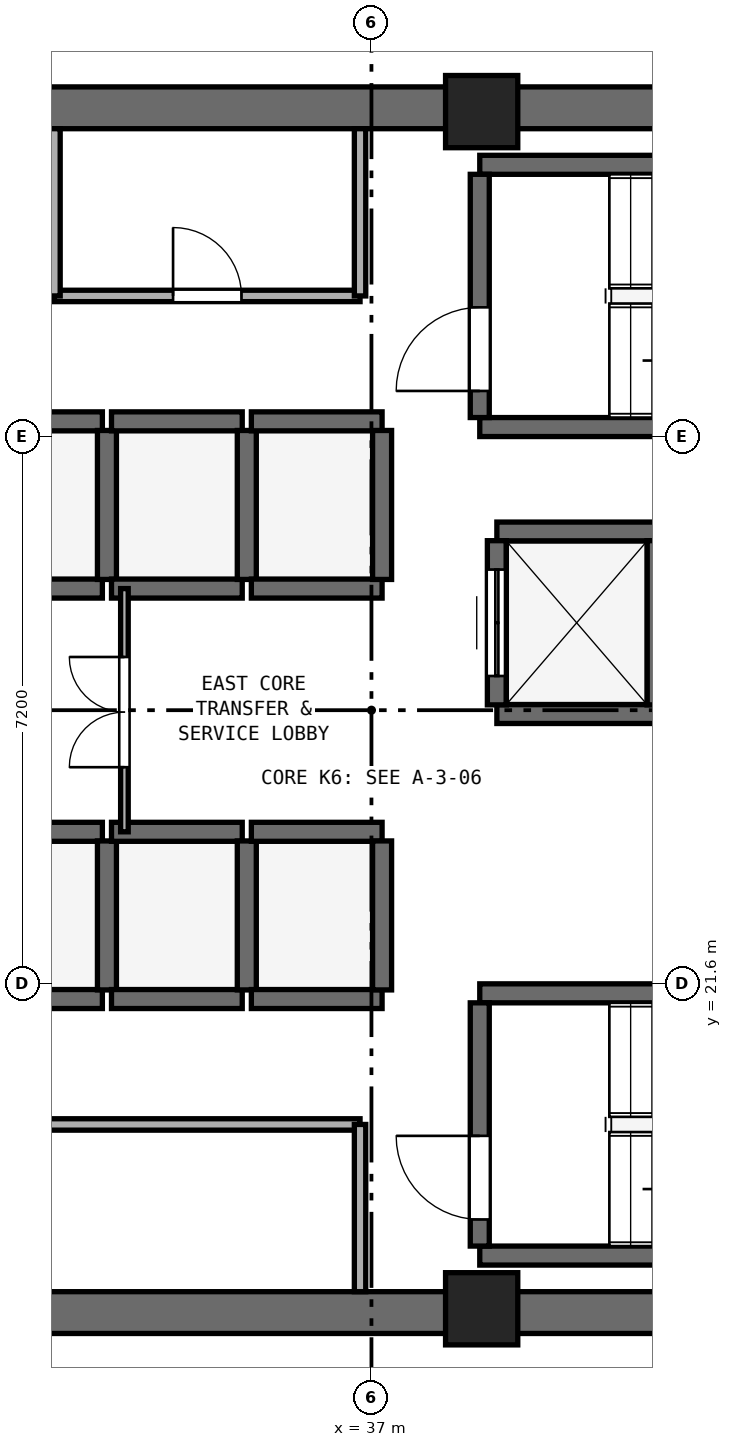
"""IFC4 building model, lengths in metres.
Left out: names, types, materials, properties, quantities, classifications, styles, units other than length and angle.
Written with IfcOpenShell. Run it as: python <this file> out.ifc"""

import sys

from ifc_helpers import new_model, si_unit, direction, frame, frame_2d, origin, origin_2d, place, context, subcontext, project, spatial, rectangle, extrude, element, fill, save


model = new_model("IFC4")
c1 = context("Model", 3, precision=1e-05, world=origin(), true_north=direction((0.0, 1.0)))
c2 = subcontext(c1, "Body", "Model", "MODEL_VIEW")
j1 = project(units=[si_unit("LENGTHUNIT", "METRE"), si_unit("PLANEANGLEUNIT", "RADIAN")], contexts=[c1])
p1 = place(None, origin())
s1 = spatial("IfcSite", under=j1, at=p1, CompositionType="ELEMENT")
p2 = place(p1, origin())
s2 = spatial("IfcBuilding", under=s1, at=p2, CompositionType="ELEMENT")
p3 = place(p2, frame((0.0, 0.0, 220.0)))
s3 = spatial("IfcBuildingStorey", under=s2, at=p3, CompositionType="ELEMENT", Elevation=220.0)
for number, where, z_axis, x_axis in (
    (1, (25.4, 17.275, 0.0), (0.0, 0.0, 1.0), (1.0, 0.0, 0.0)),
    (2, (25.4, 33.125, 0.0), (0.0, 0.0, 1.0), (1.0, 0.0, 0.0)),
):
    element("IfcWall", number, at=place(p3, frame(where, z_axis=z_axis, x_axis=x_axis)), inside=s3, PredefinedType="SHEAR", context=c2, shape_type="SweptSolid", body=[
        extrude(rectangle(XDim=23.2, YDim=0.55, at=frame_2d((11.6, 0.0))), origin(), (0.0, 0.0, 1.0), 4.71),
    ])
for number, where, z_axis, x_axis in (
    (3, (38.45, 17.325, 0.0), (0.0, 0.0, 1.0), (1.0, 0.0, 0.0)),
    (4, (38.45, 33.075, 0.0), (0.0, 0.0, 1.0), (1.0, 0.0, 0.0)),
):
    element("IfcColumn", number, at=place(p3, frame(where, z_axis=z_axis, x_axis=x_axis)), inside=s3, PredefinedType="PILASTER", context=c2, shape_type="SweptSolid", body=[
        extrude(rectangle(XDim=0.95, YDim=0.95, at=origin_2d()), origin(), (0.0, 0.0, 1.0), 5.0),
    ])
for number, where, z_axis, x_axis in (
    (5, (38.425, 28.925, 0.0), (0.0, 0.0, 1.0), (1.0, 0.0, 0.0)),
    (6, (38.425, 32.375, 0.0), (0.0, 0.0, 1.0), (1.0, 0.0, 0.0)),
):
    element("IfcWall", number, at=place(p3, frame(where, z_axis=z_axis, x_axis=x_axis)), inside=s3, PredefinedType="SHEAR", context=c2, shape_type="SweptSolid", body=[
        extrude(rectangle(XDim=7.3, YDim=0.25, at=frame_2d((3.65, 0.0))), origin(), (0.0, 0.0, 1.0), 4.71),
    ])
p4 = place(p3, frame((38.425, 29.05, 0.0), z_axis=(0.0, 0.0, 1.0), x_axis=(0.0, 1.0, 0.0)))
e7 = element("IfcWall", 7, at=p4, inside=s3, PredefinedType="SHEAR", context=c2, shape_type="SweptSolid", body=[
    extrude(rectangle(XDim=3.2, YDim=0.25, at=frame_2d((1.6, 0.0))), origin(), (0.0, 0.0, 1.0), 4.71),
])
p5 = place(p4, frame((0.35, 0.0, 0.0)))
e8 = element("IfcOpeningElement", 8, at=p5, cuts=e7, PredefinedType="OPENING", context=c2, shape_type="SweptSolid", body=[
    extrude(rectangle(XDim=1.1, YDim=2.15, at=frame_2d((0.55, 1.075))), frame((0.0, 0.135, 0.0), z_axis=(0.0, -1.0, 0.0), x_axis=(1.0, 0.0, 0.0)), (0.0, 0.0, 1.0), 0.27),
])
for number, where, z_axis, x_axis in (
    (9, (38.425, 18.025, 0.0), (0.0, 0.0, 1.0), (1.0, 0.0, 0.0)),
    (10, (38.425, 21.475, 0.0), (0.0, 0.0, 1.0), (1.0, 0.0, 0.0)),
):
    element("IfcWall", number, at=place(p3, frame(where, z_axis=z_axis, x_axis=x_axis)), inside=s3, PredefinedType="SHEAR", context=c2, shape_type="SweptSolid", body=[
        extrude(rectangle(XDim=7.3, YDim=0.25, at=frame_2d((3.65, 0.0))), origin(), (0.0, 0.0, 1.0), 4.71),
    ])
p6 = place(p3, frame((38.425, 18.15, 0.0), z_axis=(0.0, 0.0, 1.0), x_axis=(0.0, 1.0, 0.0)))
e11 = element("IfcWall", 11, at=p6, inside=s3, PredefinedType="SHEAR", context=c2, shape_type="SweptSolid", body=[
    extrude(rectangle(XDim=3.2, YDim=0.25, at=frame_2d((1.6, 0.0))), origin(), (0.0, 0.0, 1.0), 4.71),
])
p7 = place(p6, frame((0.35, 0.0, 0.0)))
e12 = element("IfcOpeningElement", 12, at=p7, cuts=e11, PredefinedType="OPENING", context=c2, shape_type="SweptSolid", body=[
    extrude(rectangle(XDim=1.1, YDim=2.15, at=frame_2d((0.55, 1.075))), frame((0.0, 0.135, 0.0), z_axis=(0.0, -1.0, 0.0), x_axis=(1.0, 0.0, 0.0)), (0.0, 0.0, 1.0), 0.27),
])
for number, where, z_axis, x_axis in (
    (13, (31.74, 21.4, 0.0), (0.0, 0.0, 1.0), (1.0, 0.0, 0.0)),
    (14, (31.74, 23.6, 0.0), (0.0, 0.0, 1.0), (1.0, 0.0, 0.0)),
):
    element("IfcWall", number, at=place(p3, frame(where, z_axis=z_axis, x_axis=x_axis)), inside=s3, PredefinedType="SHEAR", context=c2, shape_type="SweptSolid", body=[
        extrude(rectangle(XDim=1.72, YDim=0.25, at=frame_2d((0.86, 0.0))), origin(), (0.0, 0.0, 1.0), 4.71),
    ])
p8 = place(p3, frame((33.52, 21.52, 0.0), z_axis=(0.0, 0.0, 1.0), x_axis=(0.0, 1.0, 0.0)))
e15 = element("IfcWall", 15, at=p8, inside=s3, PredefinedType="SHEAR", context=c2, shape_type="SweptSolid", body=[
    extrude(rectangle(XDim=1.96, YDim=0.25, at=frame_2d((0.98, 0.0))), origin(), (0.0, 0.0, 1.0), 4.71),
])
for number, where, z_axis, x_axis in (
    (16, (33.58, 21.4, 0.0), (0.0, 0.0, 1.0), (1.0, 0.0, 0.0)),
    (17, (33.58, 23.6, 0.0), (0.0, 0.0, 1.0), (1.0, 0.0, 0.0)),
):
    element("IfcWall", number, at=place(p3, frame(where, z_axis=z_axis, x_axis=x_axis)), inside=s3, PredefinedType="SHEAR", context=c2, shape_type="SweptSolid", body=[
        extrude(rectangle(XDim=1.72, YDim=0.25, at=frame_2d((0.86, 0.0))), origin(), (0.0, 0.0, 1.0), 4.71),
    ])
p9 = place(p3, frame((35.36, 21.52, 0.0), z_axis=(0.0, 0.0, 1.0), x_axis=(0.0, 1.0, 0.0)))
e18 = element("IfcWall", 18, at=p9, inside=s3, PredefinedType="SHEAR", context=c2, shape_type="SweptSolid", body=[
    extrude(rectangle(XDim=1.96, YDim=0.25, at=frame_2d((0.98, 0.0))), origin(), (0.0, 0.0, 1.0), 4.71),
])
for number, where, z_axis, x_axis in (
    (19, (35.42, 21.4, 0.0), (0.0, 0.0, 1.0), (1.0, 0.0, 0.0)),
    (20, (35.42, 23.6, 0.0), (0.0, 0.0, 1.0), (1.0, 0.0, 0.0)),
):
    element("IfcWall", number, at=place(p3, frame(where, z_axis=z_axis, x_axis=x_axis)), inside=s3, PredefinedType="SHEAR", context=c2, shape_type="SweptSolid", body=[
        extrude(rectangle(XDim=1.72, YDim=0.25, at=frame_2d((0.86, 0.0))), origin(), (0.0, 0.0, 1.0), 4.71),
    ])
p10 = place(p3, frame((37.14, 21.52, 0.0), z_axis=(0.0, 0.0, 1.0), x_axis=(0.0, 1.0, 0.0)))
e21 = element("IfcWall", 21, at=p10, inside=s3, PredefinedType="SHEAR", context=c2, shape_type="SweptSolid", body=[
    extrude(rectangle(XDim=1.96, YDim=0.25, at=frame_2d((0.98, 0.0))), origin(), (0.0, 0.0, 1.0), 4.71),
])
for number, where, z_axis, x_axis in (
    (22, (31.74, 26.8, 0.0), (0.0, 0.0, 1.0), (1.0, 0.0, 0.0)),
    (23, (31.74, 29.0, 0.0), (0.0, 0.0, 1.0), (1.0, 0.0, 0.0)),
):
    element("IfcWall", number, at=place(p3, frame(where, z_axis=z_axis, x_axis=x_axis)), inside=s3, PredefinedType="SHEAR", context=c2, shape_type="SweptSolid", body=[
        extrude(rectangle(XDim=1.72, YDim=0.25, at=frame_2d((0.86, 0.0))), origin(), (0.0, 0.0, 1.0), 4.71),
    ])
p11 = place(p3, frame((33.52, 26.92, 0.0), z_axis=(0.0, 0.0, 1.0), x_axis=(0.0, 1.0, 0.0)))
e24 = element("IfcWall", 24, at=p11, inside=s3, PredefinedType="SHEAR", context=c2, shape_type="SweptSolid", body=[
    extrude(rectangle(XDim=1.96, YDim=0.25, at=frame_2d((0.98, 0.0))), origin(), (0.0, 0.0, 1.0), 4.71),
])
for number, where, z_axis, x_axis in (
    (25, (33.58, 26.8, 0.0), (0.0, 0.0, 1.0), (1.0, 0.0, 0.0)),
    (26, (33.58, 29.0, 0.0), (0.0, 0.0, 1.0), (1.0, 0.0, 0.0)),
):
    element("IfcWall", number, at=place(p3, frame(where, z_axis=z_axis, x_axis=x_axis)), inside=s3, PredefinedType="SHEAR", context=c2, shape_type="SweptSolid", body=[
        extrude(rectangle(XDim=1.72, YDim=0.25, at=frame_2d((0.86, 0.0))), origin(), (0.0, 0.0, 1.0), 4.71),
    ])
p12 = place(p3, frame((35.36, 26.92, 0.0), z_axis=(0.0, 0.0, 1.0), x_axis=(0.0, 1.0, 0.0)))
e27 = element("IfcWall", 27, at=p12, inside=s3, PredefinedType="SHEAR", context=c2, shape_type="SweptSolid", body=[
    extrude(rectangle(XDim=1.96, YDim=0.25, at=frame_2d((0.98, 0.0))), origin(), (0.0, 0.0, 1.0), 4.71),
])
for number, where, z_axis, x_axis in (
    (28, (35.42, 26.8, 0.0), (0.0, 0.0, 1.0), (1.0, 0.0, 0.0)),
    (29, (35.42, 29.0, 0.0), (0.0, 0.0, 1.0), (1.0, 0.0, 0.0)),
):
    element("IfcWall", number, at=place(p3, frame(where, z_axis=z_axis, x_axis=x_axis)), inside=s3, PredefinedType="SHEAR", context=c2, shape_type="SweptSolid", body=[
        extrude(rectangle(XDim=1.72, YDim=0.25, at=frame_2d((0.86, 0.0))), origin(), (0.0, 0.0, 1.0), 4.71),
    ])
p13 = place(p3, frame((37.14, 26.92, 0.0), z_axis=(0.0, 0.0, 1.0), x_axis=(0.0, 1.0, 0.0)))
e30 = element("IfcWall", 30, at=p13, inside=s3, PredefinedType="SHEAR", context=c2, shape_type="SweptSolid", body=[
    extrude(rectangle(XDim=1.96, YDim=0.25, at=frame_2d((0.98, 0.0))), origin(), (0.0, 0.0, 1.0), 4.71),
])
for number, where, z_axis, x_axis in (
    (31, (38.65, 25.15, 0.0), (0.0, 0.0, 1.0), (1.0, 0.0, 0.0)),
    (32, (38.65, 27.55, 0.0), (0.0, 0.0, 1.0), (1.0, 0.0, 0.0)),
):
    element("IfcWall", number, at=place(p3, frame(where, z_axis=z_axis, x_axis=x_axis)), inside=s3, PredefinedType="SHEAR", context=c2, shape_type="SweptSolid", body=[
        extrude(rectangle(XDim=2.1, YDim=0.25, at=frame_2d((1.05, 0.0))), origin(), (0.0, 0.0, 1.0), 4.71),
    ])
p14 = place(p3, frame((38.65, 25.27, 0.0), z_axis=(0.0, 0.0, 1.0), x_axis=(0.0, 1.0, 0.0)))
e33 = element("IfcWall", 33, at=p14, inside=s3, PredefinedType="SHEAR", context=c2, shape_type="SweptSolid", body=[
    extrude(rectangle(XDim=2.16, YDim=0.25, at=frame_2d((1.08, 0.0))), origin(), (0.0, 0.0, 1.0), 4.71),
])
p15 = place(p14, frame((0.38, 0.0, 0.0)))
e34 = element("IfcOpeningElement", 34, at=p15, cuts=e33, PredefinedType="OPENING", context=c2, shape_type="SweptSolid", body=[
    extrude(rectangle(XDim=1.4, YDim=2.2, at=frame_2d((0.7, 1.1))), frame((0.0, 0.135, 0.0), z_axis=(0.0, -1.0, 0.0), x_axis=(1.0, 0.0, 0.0)), (0.0, 0.0, 1.0), 0.27),
])
p16 = place(p3, frame((40.75, 25.27, 0.0), z_axis=(0.0, 0.0, 1.0), x_axis=(0.0, 1.0, 0.0)))
e35 = element("IfcWall", 35, at=p16, inside=s3, PredefinedType="SHEAR", context=c2, shape_type="SweptSolid", body=[
    extrude(rectangle(XDim=2.16, YDim=0.25, at=frame_2d((1.08, 0.0))), origin(), (0.0, 0.0, 1.0), 4.71),
])
p17 = place(p3, frame((32.83, 30.65, 0.0), z_axis=(0.0, 0.0, 1.0), x_axis=(1.0, 0.0, 0.0)))
e36 = element("IfcWall", 36, at=p17, inside=s3, PredefinedType="PARTITIONING", context=c2, shape_type="SweptSolid", body=[
    extrude(rectangle(XDim=4.02, YDim=0.15, at=frame_2d((2.01, 0.0))), origin(), (0.0, 0.0, 1.0), 4.71),
])
p18 = place(p17, frame((1.56, 0.0, 0.0)))
e37 = element("IfcOpeningElement", 37, at=p18, cuts=e36, PredefinedType="OPENING", context=c2, shape_type="SweptSolid", body=[
    extrude(rectangle(XDim=0.9, YDim=2.1, at=frame_2d((0.45, 1.05))), frame((0.0, 0.085, 0.0), z_axis=(0.0, -1.0, 0.0), x_axis=(1.0, 0.0, 0.0)), (0.0, 0.0, 1.0), 0.17),
])
for number, where, z_axis, x_axis in (
    (38, (32.83, 30.65, 0.0), (0.0, 0.0, 1.0), (0.0, 1.0, 0.0)),
    (39, (36.85, 30.65, 0.0), (0.0, 0.0, 1.0), (0.0, 1.0, 0.0)),
):
    element("IfcWall", number, at=place(p3, frame(where, z_axis=z_axis, x_axis=x_axis)), inside=s3, PredefinedType="PARTITIONING", context=c2, shape_type="SweptSolid", body=[
        extrude(rectangle(XDim=2.2, YDim=0.15, at=frame_2d((1.1, 0.0))), origin(), (0.0, 0.0, 1.0), 4.71),
    ])
p19 = place(p3, frame((26.07, 19.75, 0.0), z_axis=(0.0, 0.0, 1.0), x_axis=(1.0, 0.0, 0.0)))
e40 = element("IfcWall", 40, at=p19, inside=s3, PredefinedType="PARTITIONING", context=c2, shape_type="SweptSolid", body=[
    extrude(rectangle(XDim=10.78, YDim=0.15, at=frame_2d((5.39, 0.0))), origin(), (0.0, 0.0, 1.0), 4.71),
])
p20 = place(p19, frame((4.915, 0.0, 0.0)))
e41 = element("IfcOpeningElement", 41, at=p20, cuts=e40, PredefinedType="OPENING", context=c2, shape_type="SweptSolid", body=[
    extrude(rectangle(XDim=0.95, YDim=2.1, at=frame_2d((0.475, 1.05))), frame((0.0, 0.085, 0.0), z_axis=(0.0, -1.0, 0.0), x_axis=(1.0, 0.0, 0.0)), (0.0, 0.0, 1.0), 0.17),
])
p21 = place(p3, frame((36.85, 17.55, 0.0), z_axis=(0.0, 0.0, 1.0), x_axis=(0.0, 1.0, 0.0)))
e42 = element("IfcWall", 42, at=p21, inside=s3, PredefinedType="PARTITIONING", context=c2, shape_type="SweptSolid", body=[
    extrude(rectangle(XDim=2.2, YDim=0.15, at=frame_2d((1.1, 0.0))), origin(), (0.0, 0.0, 1.0), 4.71),
])
p22 = place(p3, frame((33.75, 23.6, 0.0), z_axis=(0.0, 0.0, 1.0), x_axis=(0.0, 1.0, 0.0)))
e43 = element("IfcWall", 43, at=p22, inside=s3, PredefinedType="PARTITIONING", context=c2, shape_type="SweptSolid", body=[
    extrude(rectangle(XDim=3.2, YDim=0.1, at=frame_2d((1.6, 0.0))), origin(), (0.0, 0.0, 1.0), 4.71),
])
p23 = place(p22, frame((0.85, 0.0, 0.0)))
e44 = element("IfcOpeningElement", 44, at=p23, cuts=e43, PredefinedType="OPENING", context=c2, shape_type="SweptSolid", body=[
    extrude(rectangle(XDim=1.45, YDim=2.12, at=frame_2d((0.725, 1.06))), frame((0.0, 0.06, 0.0), z_axis=(0.0, -1.0, 0.0), x_axis=(1.0, 0.0, 0.0)), (0.0, 0.0, 1.0), 0.12),
])
p24 = place(p5, origin())
e45 = element("IfcDoor", 45, at=p24, inside=s3, OperationType="SINGLE_SWING_LEFT", PredefinedType="DOOR", context=c2, shape_type="SweptSolid", body=[
    extrude(rectangle(XDim=1.1, YDim=2.15, at=frame_2d((0.55, 1.075))), frame((0.0, 0.025, 0.0), z_axis=(0.0, -1.0, 0.0), x_axis=(1.0, 0.0, 0.0)), (0.0, 0.0, 1.0), 0.05),
])
fill(e8, e45)
p25 = place(p7, origin())
e46 = element("IfcDoor", 46, at=p25, inside=s3, OperationType="SINGLE_SWING_RIGHT", PredefinedType="DOOR", context=c2, shape_type="SweptSolid", body=[
    extrude(rectangle(XDim=1.1, YDim=2.15, at=frame_2d((0.55, 1.075))), frame((0.0, 0.025, 0.0), z_axis=(0.0, -1.0, 0.0), x_axis=(1.0, 0.0, 0.0)), (0.0, 0.0, 1.0), 0.05),
])
fill(e12, e46)
p26 = place(p15, origin())
e47 = element("IfcDoor", 47, at=p26, inside=s3, OperationType="DOUBLE_DOOR_SLIDING", PredefinedType="DOOR", context=c2, shape_type="SweptSolid", body=[
    extrude(rectangle(XDim=1.4, YDim=2.2, at=frame_2d((0.7, 1.1))), frame((0.0, 0.025, 0.0), z_axis=(0.0, -1.0, 0.0), x_axis=(1.0, 0.0, 0.0)), (0.0, 0.0, 1.0), 0.05),
])
fill(e34, e47)
p27 = place(p18, origin())
e48 = element("IfcDoor", 48, at=p27, inside=s3, OperationType="SINGLE_SWING_LEFT", PredefinedType="DOOR", context=c2, shape_type="SweptSolid", body=[
    extrude(rectangle(XDim=0.9, YDim=2.1, at=frame_2d((0.45, 1.05))), frame((0.0, 0.025, 0.0), z_axis=(0.0, -1.0, 0.0), x_axis=(1.0, 0.0, 0.0)), (0.0, 0.0, 1.0), 0.05),
])
fill(e37, e48)
p28 = place(p23, origin())
e49 = element("IfcDoor", 49, at=p28, inside=s3, OperationType="DOUBLE_DOOR_SINGLE_SWING", PredefinedType="DOOR", context=c2, shape_type="SweptSolid", body=[
    extrude(rectangle(XDim=1.45, YDim=2.12, at=frame_2d((0.725, 1.06))), frame((0.0, 0.025, 0.0), z_axis=(0.0, -1.0, 0.0), x_axis=(1.0, 0.0, 0.0)), (0.0, 0.0, 1.0), 0.05),
])
fill(e44, e49)
save(model, sys.argv[1])
